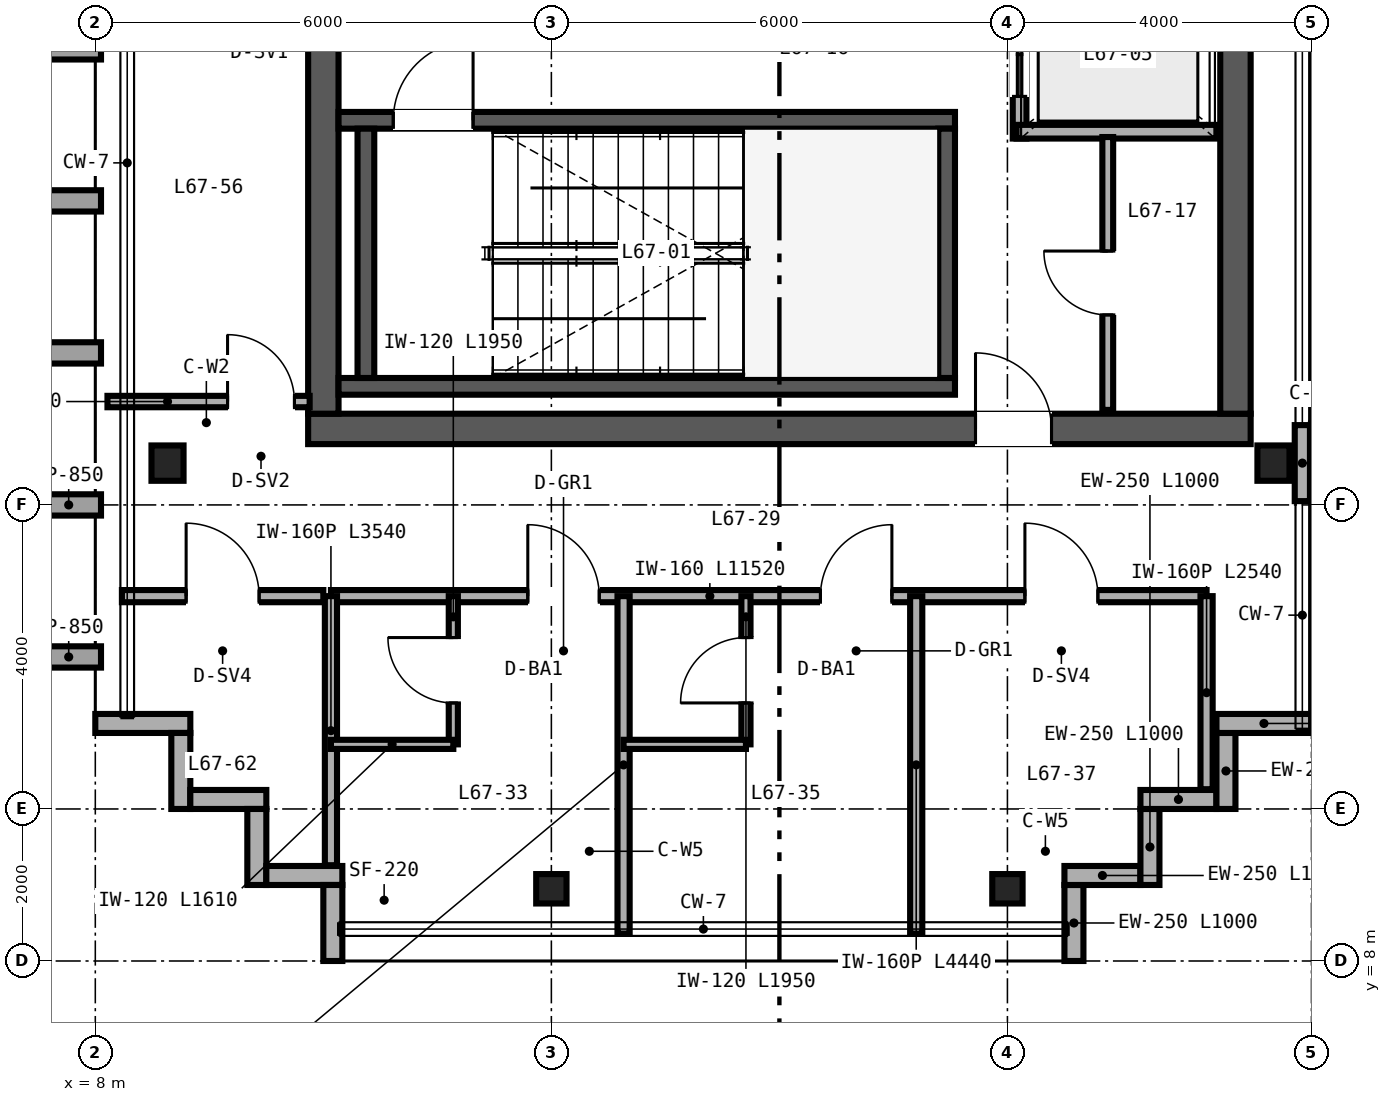
"""IFC4 building model, lengths in metres.
Left out: names, types, materials, properties, quantities, classifications, styles, units other than length and angle.
Written with IfcOpenShell. Run it as: python <this file> out.ifc"""

import sys

from ifc_helpers import new_model, si_unit, direction, frame, frame_2d, origin, origin_2d, place, context, subcontext, project, spatial, rectangle, i_section, extrude, source, transform, mapped, element, fill, save


model = new_model("IFC4")
c1 = context("Model", 3, precision=1e-05, world=origin(), true_north=direction((0.0, 1.0)))
c2 = subcontext(c1, "Body", "Model", "MODEL_VIEW")
j1 = project(units=[si_unit("LENGTHUNIT", "METRE"), si_unit("PLANEANGLEUNIT", "RADIAN")], contexts=[c1])
p1 = place(None, origin())
s1 = spatial("IfcSite", under=j1, at=p1, CompositionType="ELEMENT")
p2 = place(p1, origin())
s2 = spatial("IfcBuilding", under=s1, at=p2, CompositionType="ELEMENT")
p3 = place(p2, frame((0.0, 0.0, 265.2)))
s3 = spatial("IfcBuildingStorey", under=s2, at=p3, CompositionType="ELEMENT", Elevation=265.2)
p4 = place(p3, frame((10.8, 15.0, 0.0), z_axis=(0.0, 0.0, 1.0), x_axis=(1.0, 0.0, 0.0)))
e1 = element("IfcWall", 1, at=p4, inside=s3, PredefinedType="SHEAR", context=c2, shape_type="SweptSolid", body=[
    extrude(rectangle(XDim=12.4, YDim=0.4, at=frame_2d((6.2, 0.0))), origin(), (0.0, 0.0, 1.0), 3.38),
])
p5 = place(p4, frame((8.78, 0.0, 0.0)))
e2 = element("IfcOpeningElement", 2, at=p5, cuts=e1, PredefinedType="OPENING", context=c2, shape_type="SweptSolid", body=[
    extrude(rectangle(XDim=1.0, YDim=2.15, at=frame_2d((0.5, 1.075))), frame((0.0, 0.21, 0.0), z_axis=(0.0, -1.0, 0.0), x_axis=(1.0, 0.0, 0.0)), (0.0, 0.0, 1.0), 0.42),
])
for number, where, z_axis, x_axis in (
    (3, (11.0, 15.2, 0.0), (0.0, 0.0, 1.0), (0.0, 1.0, 0.0)),
    (4, (23.0, 15.2, 0.0), (0.0, 0.0, 1.0), (0.0, 1.0, 0.0)),
):
    element("IfcWall", number, at=place(p3, frame(where, z_axis=z_axis, x_axis=x_axis)), inside=s3, PredefinedType="SHEAR", context=c2, shape_type="SweptSolid", body=[
        extrude(rectangle(XDim=21.6, YDim=0.4, at=frame_2d((10.8, 0.0))), origin(), (0.0, 0.0, 1.0), 3.38),
    ])
p6 = place(p3, frame((11.2, 15.56, 0.0), z_axis=(0.0, 0.0, 1.0), x_axis=(1.0, 0.0, 0.0)))
e5 = element("IfcWall", 5, at=p6, inside=s3, PredefinedType="SHEAR", context=c2, shape_type="SweptSolid", body=[
    extrude(rectangle(XDim=8.11, YDim=0.22, at=frame_2d((4.055, 0.0))), origin(), (0.0, 0.0, 1.0), 3.4),
])
p7 = place(p3, frame((11.2, 19.06, 0.0), z_axis=(0.0, 0.0, 1.0), x_axis=(1.0, 0.0, 0.0)))
e6 = element("IfcWall", 6, at=p7, inside=s3, PredefinedType="SHEAR", context=c2, shape_type="SweptSolid", body=[
    extrude(rectangle(XDim=8.11, YDim=0.22, at=frame_2d((4.055, 0.0))), origin(), (0.0, 0.0, 1.0), 3.4),
])
p8 = place(p7, frame((0.72, 0.0, 0.0)))
e7 = element("IfcOpeningElement", 7, at=p8, cuts=e6, PredefinedType="OPENING", context=c2, shape_type="SweptSolid", body=[
    extrude(rectangle(XDim=1.05, YDim=2.15, at=frame_2d((0.525, 1.075))), frame((0.0, 0.12, 0.0), z_axis=(0.0, -1.0, 0.0), x_axis=(1.0, 0.0, 0.0)), (0.0, 0.0, 1.0), 0.24),
])
for number, where, z_axis, x_axis in (
    (8, (11.56, 15.67, 0.0), (0.0, 0.0, 1.0), (0.0, 1.0, 0.0)),
    (9, (19.2, 15.67, 0.0), (0.0, 0.0, 1.0), (0.0, 1.0, 0.0)),
):
    element("IfcWall", number, at=place(p3, frame(where, z_axis=z_axis, x_axis=x_axis)), inside=s3, PredefinedType="SHEAR", context=c2, shape_type="SweptSolid", body=[
        extrude(rectangle(XDim=3.28, YDim=0.22, at=frame_2d((1.64, 0.0))), origin(), (0.0, 0.0, 1.0), 3.4),
    ])
m1 = source(origin(), c2, "Body", "SweptSolid", [
    extrude(i_section(OverallWidth=0.422, OverallDepth=0.465, WebThickness=0.045, FlangeThickness=0.073, FilletRadius=0.025, at=origin_2d()), origin(), (0.0, 0.0, 1.0), 3.38),
])
for number, where, z_axis, x_axis in (
    (10, (8.95, 14.55, 0.0), (0.0, 0.0, 1.0), (1.0, 0.0, 0.0)),
    (11, (23.5, 14.55, 0.0), (0.0, 0.0, 1.0), (1.0, 0.0, 0.0)),
):
    element("IfcColumn", number, at=place(p3, frame(where, z_axis=z_axis, x_axis=x_axis)), inside=s3, PredefinedType="COLUMN", context=c2, shape_type="MappedRepresentation", body=[
        mapped(m1, transform((0.0, 0.0, 0.0), scale=1.0)),
    ])
m2 = source(origin(), c2, "Body", "SweptSolid", [
    extrude(i_section(OverallWidth=0.399, OverallDepth=0.387, WebThickness=0.021, FlangeThickness=0.033, FilletRadius=0.025, at=origin_2d()), origin(), (0.0, 0.0, 1.0), 3.38),
])
for number, where, z_axis, x_axis in (
    (12, (14.0, 8.95, 0.0), (0.0, 0.0, 1.0), (1.0, 0.0, 0.0)),
    (13, (20.0, 8.95, 0.0), (0.0, 0.0, 1.0), (1.0, 0.0, 0.0)),
):
    element("IfcColumn", number, at=place(p3, frame(where, z_axis=z_axis, x_axis=x_axis)), inside=s3, PredefinedType="COLUMN", context=c2, shape_type="MappedRepresentation", body=[
        mapped(m2, transform((0.0, 0.0, 0.0), scale=1.0)),
    ])
for number, where, z_axis, x_axis in (
    (14, (20.875, 8.0, 0.0), (0.0, 0.0, 1.0), (0.0, 1.0, 0.0)),
    (15, (20.75, 9.125, 0.0), (0.0, 0.0, 1.0), (1.0, 0.0, 0.0)),
    (16, (21.875, 9.0, 0.0), (0.0, 0.0, 1.0), (0.0, 1.0, 0.0)),
    (17, (21.75, 10.125, 0.0), (0.0, 0.0, 1.0), (1.0, 0.0, 0.0)),
    (18, (22.875, 10.0, 0.0), (0.0, 0.0, 1.0), (0.0, 1.0, 0.0)),
):
    element("IfcWall", number, at=place(p3, frame(where, z_axis=z_axis, x_axis=x_axis)), inside=s3, PredefinedType="SOLIDWALL", context=c2, shape_type="SweptSolid", body=[
        extrude(rectangle(XDim=1.0, YDim=0.25, at=frame_2d((0.5, 0.0))), origin(), (0.0, 0.0, 1.0), 3.38),
    ])
for number, where, z_axis, x_axis in (
    (19, (22.75, 11.125, 0.0), (0.0, 0.0, 1.0), (1.0, 0.0, 0.0)),
    (20, (8.0, 11.125, 0.0), (0.0, 0.0, 1.0), (1.0, 0.0, 0.0)),
):
    element("IfcWall", number, at=place(p3, frame(where, z_axis=z_axis, x_axis=x_axis)), inside=s3, PredefinedType="SOLIDWALL", context=c2, shape_type="SweptSolid", body=[
        extrude(rectangle(XDim=1.25, YDim=0.25, at=frame_2d((0.625, 0.0))), origin(), (0.0, 0.0, 1.0), 3.38),
    ])
for number, where, z_axis, x_axis in (
    (21, (9.125, 11.0, 0.0), (0.0, 0.0, 1.0), (0.0, -1.0, 0.0)),
    (22, (9.25, 10.125, 0.0), (0.0, 0.0, 1.0), (1.0, 0.0, 0.0)),
    (23, (10.125, 10.0, 0.0), (0.0, 0.0, 1.0), (0.0, -1.0, 0.0)),
    (24, (10.25, 9.125, 0.0), (0.0, 0.0, 1.0), (1.0, 0.0, 0.0)),
    (25, (11.125, 9.0, 0.0), (0.0, 0.0, 1.0), (0.0, -1.0, 0.0)),
):
    element("IfcWall", number, at=place(p3, frame(where, z_axis=z_axis, x_axis=x_axis)), inside=s3, PredefinedType="SOLIDWALL", context=c2, shape_type="SweptSolid", body=[
        extrude(rectangle(XDim=1.0, YDim=0.25, at=frame_2d((0.5, 0.0))), origin(), (0.0, 0.0, 1.0), 3.38),
    ])
p9 = place(p3, frame((23.88, 14.05, 0.0), z_axis=(0.0, 0.0, 1.0), x_axis=(0.0, 1.0, 0.0)))
e26 = element("IfcWall", 26, at=p9, inside=s3, PredefinedType="PARAPET", context=c2, shape_type="SweptSolid", body=[
    extrude(rectangle(XDim=1.0, YDim=0.2, at=frame_2d((0.5, 0.0))), origin(), (0.0, 0.0, 1.0), 3.38),
])
p10 = place(p3, frame((20.16, 18.82, 0.0), z_axis=(0.0, 0.0, 1.0), x_axis=(0.0, 1.0, 0.0)))
e27 = element("IfcWall", 27, at=p10, inside=s3, PredefinedType="SOLIDWALL", context=c2, shape_type="SweptSolid", body=[
    extrude(rectangle(XDim=6.32, YDim=0.18, at=frame_2d((3.16, 0.0))), origin(), (0.0, 0.0, 1.0), 2.48),
])
p11 = place(p10, frame((0.555, 0.0, 0.0)))
e28 = element("IfcOpeningElement", 28, at=p11, cuts=e27, PredefinedType="OPENING", context=c2, shape_type="SweptSolid", body=[
    extrude(rectangle(XDim=1.1, YDim=2.2, at=frame_2d((0.55, 1.1))), frame((0.0, 0.1, 0.0), z_axis=(0.0, -1.0, 0.0), x_axis=(1.0, 0.0, 0.0)), (0.0, 0.0, 1.0), 0.2),
])
p12 = place(p10, frame((2.635, 0.0, 0.0)))
e29 = element("IfcOpeningElement", 29, at=p12, cuts=e27, PredefinedType="OPENING", context=c2, shape_type="SweptSolid", body=[
    extrude(rectangle(XDim=1.1, YDim=2.2, at=frame_2d((0.55, 1.1))), frame((0.0, 0.1, 0.0), z_axis=(0.0, -1.0, 0.0), x_axis=(1.0, 0.0, 0.0)), (0.0, 0.0, 1.0), 0.2),
])
p13 = place(p10, frame((4.69, 0.0, 0.0)))
e30 = element("IfcOpeningElement", 30, at=p13, cuts=e27, PredefinedType="OPENING", context=c2, shape_type="SweptSolid", body=[
    extrude(rectangle(XDim=1.1, YDim=2.2, at=frame_2d((0.55, 1.1))), frame((0.0, 0.1, 0.0), z_axis=(0.0, -1.0, 0.0), x_axis=(1.0, 0.0, 0.0)), (0.0, 0.0, 1.0), 0.2),
])
p14 = place(p3, frame((20.12, 18.91, 0.0), z_axis=(0.0, 0.0, 1.0), x_axis=(1.0, 0.0, 0.0)))
e31 = element("IfcWall", 31, at=p14, inside=s3, PredefinedType="SOLIDWALL", context=c2, shape_type="SweptSolid", body=[
    extrude(rectangle(XDim=2.63, YDim=0.18, at=frame_2d((1.315, 0.0))), origin(), (0.0, 0.0, 1.0), 3.38),
])
p15 = place(p3, frame((21.32, 15.25, 0.0), z_axis=(0.0, 0.0, 1.0), x_axis=(0.0, 1.0, 0.0)))
e32 = element("IfcWall", 32, at=p15, inside=s3, PredefinedType="PARTITIONING", context=c2, shape_type="SweptSolid", body=[
    extrude(rectangle(XDim=3.59, YDim=0.142, at=frame_2d((1.795, 0.0))), origin(), (0.0, 0.0, 1.0), 3.38),
])
p16 = place(p15, frame((1.25, 0.0, 0.0)))
e33 = element("IfcOpeningElement", 33, at=p16, cuts=e32, PredefinedType="OPENING", context=c2, shape_type="SweptSolid", body=[
    extrude(rectangle(XDim=0.84, YDim=2.1, at=frame_2d((0.42, 1.05))), frame((0.0, 0.081, 0.0), z_axis=(0.0, -1.0, 0.0), x_axis=(1.0, 0.0, 0.0)), (0.0, 0.0, 1.0), 0.162),
])
p17 = place(p3, frame((11.1, 12.8, 0.0), z_axis=(0.0, 0.0, 1.0), x_axis=(1.0, 0.0, 0.0)))
e34 = element("IfcWall", 34, at=p17, inside=s3, PredefinedType="PARTITIONING", context=c2, shape_type="SweptSolid", body=[
    extrude(rectangle(XDim=11.52, YDim=0.16, at=frame_2d((5.76, 0.0))), origin(), (0.0, 0.0, 1.0), 3.38),
])
p18 = place(p17, frame((2.59, 0.0, 0.0)))
e35 = element("IfcOpeningElement", 35, at=p18, cuts=e34, PredefinedType="OPENING", context=c2, shape_type="SweptSolid", body=[
    extrude(rectangle(XDim=0.94, YDim=2.15, at=frame_2d((0.47, 1.075))), frame((0.0, 0.09, 0.0), z_axis=(0.0, -1.0, 0.0), x_axis=(1.0, 0.0, 0.0)), (0.0, 0.0, 1.0), 0.18),
])
p19 = place(p17, frame((6.44, 0.0, 0.0)))
e36 = element("IfcOpeningElement", 36, at=p19, cuts=e34, PredefinedType="OPENING", context=c2, shape_type="SweptSolid", body=[
    extrude(rectangle(XDim=0.94, YDim=2.15, at=frame_2d((0.47, 1.075))), frame((0.0, 0.09, 0.0), z_axis=(0.0, -1.0, 0.0), x_axis=(1.0, 0.0, 0.0)), (0.0, 0.0, 1.0), 0.18),
])
p20 = place(p17, frame((9.13, 0.0, 0.0)))
e37 = element("IfcOpeningElement", 37, at=p20, cuts=e34, PredefinedType="OPENING", context=c2, shape_type="SweptSolid", body=[
    extrude(rectangle(XDim=0.96, YDim=2.15, at=frame_2d((0.48, 1.075))), frame((0.0, 0.09, 0.0), z_axis=(0.0, -1.0, 0.0), x_axis=(1.0, 0.0, 0.0)), (0.0, 0.0, 1.0), 0.18),
])
p21 = place(p3, frame((11.1, 9.26, 0.0), z_axis=(0.0, 0.0, 1.0), x_axis=(0.0, 1.0, 0.0)))
e38 = element("IfcWall", 38, at=p21, inside=s3, PredefinedType="PARTITIONING", context=c2, shape_type="SweptSolid", body=[
    extrude(rectangle(XDim=3.54, YDim=0.16, at=frame_2d((1.77, 0.0))), origin(), (0.0, 0.0, 1.0), 3.38),
])
p22 = place(p3, frame((22.62, 10.26, 0.0), z_axis=(0.0, 0.0, 1.0), x_axis=(0.0, 1.0, 0.0)))
e39 = element("IfcWall", 39, at=p22, inside=s3, PredefinedType="PARTITIONING", context=c2, shape_type="SweptSolid", body=[
    extrude(rectangle(XDim=2.54, YDim=0.16, at=frame_2d((1.27, 0.0))), origin(), (0.0, 0.0, 1.0), 3.38),
])
p23 = place(p3, frame((14.95, 8.36, 0.0), z_axis=(0.0, 0.0, 1.0), x_axis=(0.0, 1.0, 0.0)))
e40 = element("IfcWall", 40, at=p23, inside=s3, PredefinedType="PARTITIONING", context=c2, shape_type="SweptSolid", body=[
    extrude(rectangle(XDim=4.44, YDim=0.16, at=frame_2d((2.22, 0.0))), origin(), (0.0, 0.0, 1.0), 2.687),
])
p24 = place(p3, frame((12.71, 10.85, 0.0), z_axis=(0.0, 0.0, 1.0), x_axis=(0.0, 1.0, 0.0)))
e41 = element("IfcWall", 41, at=p24, inside=s3, PredefinedType="PARTITIONING", context=c2, shape_type="SweptSolid", body=[
    extrude(rectangle(XDim=1.95, YDim=0.12, at=frame_2d((0.975, 0.0))), origin(), (0.0, 0.0, 1.0), 3.38),
])
p25 = place(p24, frame((0.545, 0.0, 0.0)))
e42 = element("IfcOpeningElement", 42, at=p25, cuts=e41, PredefinedType="OPENING", context=c2, shape_type="SweptSolid", body=[
    extrude(rectangle(XDim=0.86, YDim=2.1, at=frame_2d((0.43, 1.05))), frame((0.0, 0.07, 0.0), z_axis=(0.0, -1.0, 0.0), x_axis=(1.0, 0.0, 0.0)), (0.0, 0.0, 1.0), 0.14),
])
p26 = place(p3, frame((11.1, 10.85, 0.0), z_axis=(0.0, 0.0, 1.0), x_axis=(1.0, 0.0, 0.0)))
e43 = element("IfcWall", 43, at=p26, inside=s3, PredefinedType="PARTITIONING", context=c2, shape_type="SweptSolid", body=[
    extrude(rectangle(XDim=1.61, YDim=0.12, at=frame_2d((0.805, 0.0))), origin(), (0.0, 0.0, 1.0), 3.38),
])
p27 = place(p3, frame((18.8, 8.36, 0.0), z_axis=(0.0, 0.0, 1.0), x_axis=(0.0, 1.0, 0.0)))
e44 = element("IfcWall", 44, at=p27, inside=s3, PredefinedType="PARTITIONING", context=c2, shape_type="SweptSolid", body=[
    extrude(rectangle(XDim=4.44, YDim=0.16, at=frame_2d((2.22, 0.0))), origin(), (0.0, 0.0, 1.0), 2.687),
])
p28 = place(p3, frame((16.56, 10.85, 0.0), z_axis=(0.0, 0.0, 1.0), x_axis=(0.0, 1.0, 0.0)))
e45 = element("IfcWall", 45, at=p28, inside=s3, PredefinedType="PARTITIONING", context=c2, shape_type="SweptSolid", body=[
    extrude(rectangle(XDim=1.95, YDim=0.12, at=frame_2d((0.975, 0.0))), origin(), (0.0, 0.0, 1.0), 3.38),
])
p29 = place(p28, frame((0.545, 0.0, 0.0)))
e46 = element("IfcOpeningElement", 46, at=p29, cuts=e45, PredefinedType="OPENING", context=c2, shape_type="SweptSolid", body=[
    extrude(rectangle(XDim=0.86, YDim=2.1, at=frame_2d((0.43, 1.05))), frame((0.0, 0.07, 0.0), z_axis=(0.0, -1.0, 0.0), x_axis=(1.0, 0.0, 0.0)), (0.0, 0.0, 1.0), 0.14),
])
p30 = place(p3, frame((14.95, 10.85, 0.0), z_axis=(0.0, 0.0, 1.0), x_axis=(1.0, 0.0, 0.0)))
e47 = element("IfcWall", 47, at=p30, inside=s3, PredefinedType="PARTITIONING", context=c2, shape_type="SweptSolid", body=[
    extrude(rectangle(XDim=1.61, YDim=0.12, at=frame_2d((0.805, 0.0))), origin(), (0.0, 0.0, 1.0), 3.38),
])
p31 = place(p3, frame((8.16, 15.36, 0.0), z_axis=(0.0, 0.0, 1.0), x_axis=(1.0, 0.0, 0.0)))
e48 = element("IfcWall", 48, at=p31, inside=s3, PredefinedType="PARTITIONING", context=c2, shape_type="SweptSolid", body=[
    extrude(rectangle(XDim=2.66, YDim=0.15, at=frame_2d((1.33, 0.0))), origin(), (0.0, 0.0, 1.0), 2.601),
])
p32 = place(p31, frame((1.58, 0.0, 0.0)))
e49 = element("IfcOpeningElement", 49, at=p32, cuts=e48, PredefinedType="OPENING", context=c2, shape_type="SweptSolid", body=[
    extrude(rectangle(XDim=0.88, YDim=2.15, at=frame_2d((0.44, 1.075))), frame((0.0, 0.085, 0.0), z_axis=(0.0, -1.0, 0.0), x_axis=(1.0, 0.0, 0.0)), (0.0, 0.0, 1.0), 0.17),
])
p33 = place(p3, frame((8.35, 12.8, 0.0), z_axis=(0.0, 0.0, 1.0), x_axis=(1.0, 0.0, 0.0)))
e50 = element("IfcWall", 50, at=p33, inside=s3, PredefinedType="PARTITIONING", context=c2, shape_type="SweptSolid", body=[
    extrude(rectangle(XDim=2.65, YDim=0.16, at=frame_2d((1.325, 0.0))), origin(), (0.0, 0.0, 1.0), 3.38),
])
p34 = place(p33, frame((0.845, 0.0, 0.0)))
e51 = element("IfcOpeningElement", 51, at=p34, cuts=e50, PredefinedType="OPENING", context=c2, shape_type="SweptSolid", body=[
    extrude(rectangle(XDim=0.96, YDim=2.15, at=frame_2d((0.48, 1.075))), frame((0.0, 0.09, 0.0), z_axis=(0.0, -1.0, 0.0), x_axis=(1.0, 0.0, 0.0)), (0.0, 0.0, 1.0), 0.18),
])
m3 = source(origin(), c2, "Body", "SweptSolid", [
    extrude(rectangle(XDim=1.05, YDim=2.15, at=frame_2d((0.525, 1.075))), frame((0.0, 0.025, 0.0), z_axis=(0.0, -1.0, 0.0), x_axis=(1.0, 0.0, 0.0)), (0.0, 0.0, 1.0), 0.05),
])
p35 = place(p8, origin())
e52 = element("IfcDoor", 52, at=p35, inside=s3, OperationType="SINGLE_SWING_RIGHT", PredefinedType="DOOR", context=c2, shape_type="MappedRepresentation", body=[
    mapped(m3, transform((0.0, 0.0, 0.0), scale=1.0)),
])
fill(e7, e52)
m4 = source(origin(), c2, "Body", "SweptSolid", [
    extrude(rectangle(XDim=1.1, YDim=2.2, at=frame_2d((0.55, 1.1))), frame((0.0, 0.025, 0.0), z_axis=(0.0, -1.0, 0.0), x_axis=(1.0, 0.0, 0.0)), (0.0, 0.0, 1.0), 0.05),
])
p36 = place(p11, origin())
e53 = element("IfcDoor", 53, at=p36, inside=s3, OperationType="DOUBLE_DOOR_SLIDING", PredefinedType="DOOR", context=c2, shape_type="MappedRepresentation", body=[
    mapped(m4, transform((0.0, 0.0, 0.0), scale=1.0)),
])
fill(e28, e53)
m5 = source(origin(), c2, "Body", "SweptSolid", [
    extrude(rectangle(XDim=0.84, YDim=2.1, at=frame_2d((0.42, 1.05))), frame((0.0, 0.025, 0.0), z_axis=(0.0, -1.0, 0.0), x_axis=(1.0, 0.0, 0.0)), (0.0, 0.0, 1.0), 0.05),
])
p37 = place(p16, origin())
e54 = element("IfcDoor", 54, at=p37, inside=s3, OperationType="SINGLE_SWING_RIGHT", PredefinedType="DOOR", context=c2, shape_type="MappedRepresentation", body=[
    mapped(m5, transform((0.0, 0.0, 0.0), scale=1.0)),
])
fill(e33, e54)
m6 = source(origin(), c2, "Body", "SweptSolid", [
    extrude(rectangle(XDim=1.0, YDim=2.15, at=frame_2d((0.5, 1.075))), frame((0.0, 0.025, 0.0), z_axis=(0.0, -1.0, 0.0), x_axis=(1.0, 0.0, 0.0)), (0.0, 0.0, 1.0), 0.05),
])
p38 = place(p5, origin())
e55 = element("IfcDoor", 55, at=p38, inside=s3, OperationType="SINGLE_SWING_LEFT", PredefinedType="DOOR", context=c2, shape_type="MappedRepresentation", body=[
    mapped(m6, transform((0.0, 0.0, 0.0), scale=1.0)),
])
fill(e2, e55)
m7 = source(origin(), c2, "Body", "SweptSolid", [
    extrude(rectangle(XDim=0.86, YDim=2.1, at=frame_2d((0.43, 1.05))), frame((0.0, 0.025, 0.0), z_axis=(0.0, -1.0, 0.0), x_axis=(1.0, 0.0, 0.0)), (0.0, 0.0, 1.0), 0.05),
])
p39 = place(p25, origin())
e56 = element("IfcDoor", 56, at=p39, inside=s3, OperationType="SINGLE_SWING_RIGHT", PredefinedType="DOOR", context=c2, shape_type="MappedRepresentation", body=[
    mapped(m7, transform((0.0, 0.0, 0.0), scale=1.0)),
])
fill(e42, e56)
p40 = place(p29, origin())
e57 = element("IfcDoor", 57, at=p40, inside=s3, OperationType="SINGLE_SWING_LEFT", PredefinedType="DOOR", context=c2, shape_type="MappedRepresentation", body=[
    mapped(m7, transform((0.0, 0.0, 0.0), scale=1.0)),
])
fill(e46, e57)
m8 = source(origin(), c2, "Body", "SweptSolid", [
    extrude(rectangle(XDim=0.94, YDim=2.15, at=frame_2d((0.47, 1.075))), frame((0.0, 0.025, 0.0), z_axis=(0.0, -1.0, 0.0), x_axis=(1.0, 0.0, 0.0)), (0.0, 0.0, 1.0), 0.05),
])
p41 = place(p18, origin())
e58 = element("IfcDoor", 58, at=p41, inside=s3, OperationType="SINGLE_SWING_LEFT", PredefinedType="DOOR", context=c2, shape_type="MappedRepresentation", body=[
    mapped(m8, transform((0.0, 0.0, 0.0), scale=1.0)),
])
fill(e35, e58)
p42 = place(p19, origin())
e59 = element("IfcDoor", 59, at=p42, inside=s3, OperationType="SINGLE_SWING_RIGHT", PredefinedType="DOOR", context=c2, shape_type="MappedRepresentation", body=[
    mapped(m8, transform((0.0, 0.0, 0.0), scale=1.0)),
])
fill(e36, e59)
m9 = source(origin(), c2, "Body", "SweptSolid", [
    extrude(rectangle(XDim=0.96, YDim=2.15, at=frame_2d((0.48, 1.075))), frame((0.0, 0.025, 0.0), z_axis=(0.0, -1.0, 0.0), x_axis=(1.0, 0.0, 0.0)), (0.0, 0.0, 1.0), 0.05),
])
p43 = place(p20, origin())
e60 = element("IfcDoor", 60, at=p43, inside=s3, OperationType="SINGLE_SWING_LEFT", PredefinedType="DOOR", context=c2, shape_type="MappedRepresentation", body=[
    mapped(m9, transform((0.0, 0.0, 0.0), scale=1.0)),
])
fill(e37, e60)
m10 = source(origin(), c2, "Body", "SweptSolid", [
    extrude(rectangle(XDim=0.88, YDim=2.15, at=frame_2d((0.44, 1.075))), frame((0.0, 0.025, 0.0), z_axis=(0.0, -1.0, 0.0), x_axis=(1.0, 0.0, 0.0)), (0.0, 0.0, 1.0), 0.05),
])
p44 = place(p32, origin())
e61 = element("IfcDoor", 61, at=p44, inside=s3, OperationType="SINGLE_SWING_LEFT", PredefinedType="DOOR", context=c2, shape_type="MappedRepresentation", body=[
    mapped(m10, transform((0.0, 0.0, 0.0), scale=1.0)),
])
fill(e49, e61)
p45 = place(p34, origin())
e62 = element("IfcDoor", 62, at=p45, inside=s3, OperationType="SINGLE_SWING_LEFT", PredefinedType="DOOR", context=c2, shape_type="MappedRepresentation", body=[
    mapped(m9, transform((0.0, 0.0, 0.0), scale=1.0)),
])
fill(e51, e62)
save(model, sys.argv[1])
